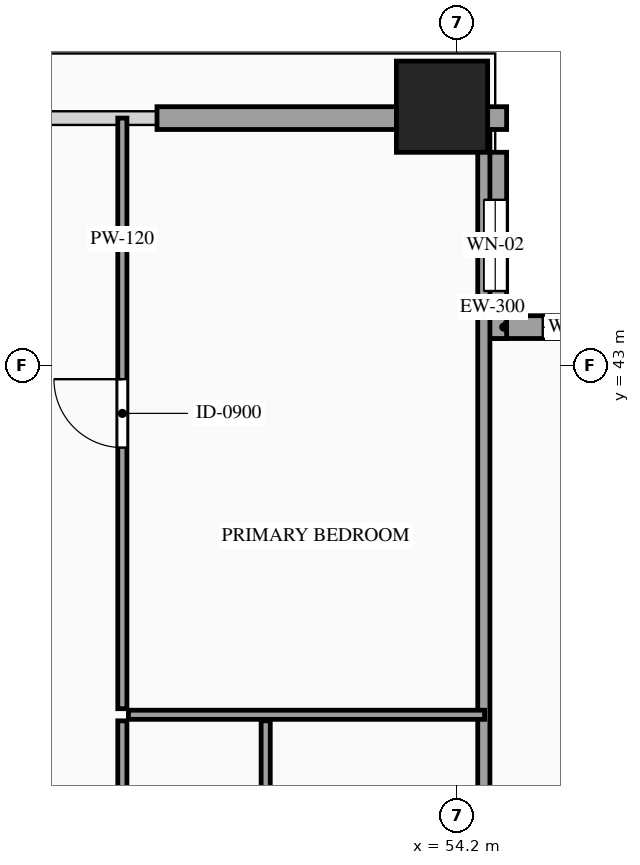
"""IFC4 building model, lengths in metres.
Left out: names, types, materials, properties, quantities, classifications, styles, units other than length and angle.
Written with IfcOpenShell. Run it as: python <this file> out.ifc"""

import sys

from ifc_helpers import new_model, si_unit, direction, frame, frame_2d, origin, origin_2d, place, context, subcontext, project, spatial, rectangle, hollow_rectangle, extrude, source, transform, mapped, element, fill, save


model = new_model("IFC4")
c1 = context("Model", 3, precision=1e-05, world=origin(), true_north=direction((0.0, 1.0)))
c2 = subcontext(c1, "Body", "Model", "MODEL_VIEW")
j1 = project(units=[si_unit("LENGTHUNIT", "METRE"), si_unit("PLANEANGLEUNIT", "RADIAN")], contexts=[c1])
p1 = place(None, origin())
s1 = spatial("IfcSite", under=j1, at=p1, CompositionType="ELEMENT")
p2 = place(p1, origin())
s2 = spatial("IfcBuilding", under=s1, at=p2, CompositionType="ELEMENT")
p3 = place(p2, frame((0.0, 0.0, 248.6)))
s3 = spatial("IfcBuildingStorey", under=s2, at=p3, CompositionType="ELEMENT", Elevation=248.6)
m1 = source(origin(), c2, "Body", "SweptSolid", [
    extrude(hollow_rectangle(XDim=1.2, YDim=1.2, WallThickness=0.055, at=origin_2d()), origin(), (0.0, 0.0, 1.0), 3.5),
])
p4 = place(p3, frame((54.0, 46.4, 0.0), z_axis=(0.0, 0.0, 1.0), x_axis=(1.0, 0.0, 0.0)))
e1 = element("IfcColumn", 1, at=p4, inside=s3, PredefinedType="COLUMN", context=c2, shape_type="MappedRepresentation", body=[
    mapped(m1, transform((0.0, 0.0, 0.0), scale=1.0)),
])
p5 = place(p3, frame((57.0, 43.5, 0.0), z_axis=(0.0, 0.0, 1.0), x_axis=(-1.0, 0.0, 0.0)))
e2 = element("IfcWall", 2, at=p5, inside=s3, PredefinedType="SOLIDWALL", context=c2, shape_type="SweptSolid", body=[
    extrude(rectangle(XDim=2.45, YDim=0.3, at=frame_2d((1.225, 0.0))), origin(), (0.0, 0.0, 1.0), 3.28),
])
p6 = place(p5, frame((0.775, 0.0, 0.85)))
e3 = element("IfcOpeningElement", 3, at=p6, cuts=e2, PredefinedType="OPENING", context=c2, shape_type="SweptSolid", body=[
    extrude(rectangle(XDim=0.9, YDim=1.5, at=frame_2d((0.45, 0.75))), frame((0.0, 0.165, 0.0), z_axis=(0.0, -1.0, 0.0), x_axis=(1.0, 0.0, 0.0)), (0.0, 0.0, 1.0), 0.33),
])
p7 = place(p3, frame((54.7, 43.35, 0.0), z_axis=(0.0, 0.0, 1.0), x_axis=(0.0, 1.0, 0.0)))
e4 = element("IfcWall", 4, at=p7, inside=s3, PredefinedType="SOLIDWALL", context=c2, shape_type="SweptSolid", body=[
    extrude(rectangle(XDim=2.45, YDim=0.3, at=frame_2d((1.225, 0.0))), origin(), (0.0, 0.0, 1.0), 3.28),
])
p8 = place(p7, frame((0.625, 0.0, 0.85)))
e5 = element("IfcOpeningElement", 5, at=p8, cuts=e4, PredefinedType="OPENING", context=c2, shape_type="SweptSolid", body=[
    extrude(rectangle(XDim=1.2, YDim=2.1, at=frame_2d((0.6, 1.05))), frame((0.0, 0.165, 0.0), z_axis=(0.0, -1.0, 0.0), x_axis=(1.0, 0.0, 0.0)), (0.0, 0.0, 1.0), 0.33),
])
m2 = source(origin(), c2, "Body", "SweptSolid", [
    extrude(rectangle(XDim=0.25, YDim=0.3, at=frame_2d((0.125, 0.0))), origin(), (0.0, 0.0, 1.0), 3.28),
])
p9 = place(p3, frame((54.6, 46.25, 0.0), z_axis=(0.0, 0.0, 1.0), x_axis=(1.0, 0.0, 0.0)))
e6 = element("IfcWall", 6, at=p9, inside=s3, PredefinedType="SOLIDWALL", context=c2, shape_type="MappedRepresentation", body=[
    mapped(m2, transform((0.0, 0.0, 0.0), scale=1.0)),
])
m3 = source(origin(), c2, "Body", "SweptSolid", [
    extrude(rectangle(XDim=3.15, YDim=0.3, at=frame_2d((1.575, 0.0))), origin(), (0.0, 0.0, 1.0), 2.835),
])
p10 = place(p3, frame((50.25, 46.25, 0.0), z_axis=(0.0, 0.0, 1.0), x_axis=(1.0, 0.0, 0.0)))
e7 = element("IfcWall", 7, at=p10, inside=s3, PredefinedType="SOLIDWALL", context=c2, shape_type="MappedRepresentation", body=[
    mapped(m3, transform((0.0, 0.0, 0.0), scale=1.0)),
])
m4 = source(origin(), c2, "Body", "SweptSolid", [
    extrude(rectangle(XDim=11.89, YDim=0.16, at=frame_2d((5.945, 0.0))), origin(), (0.0, 0.0, 1.0), 3.28),
])
p11 = place(p3, frame((54.55, 34.21, 0.0), z_axis=(0.0, 0.0, 1.0), x_axis=(0.0, 1.0, 0.0)))
e8 = element("IfcWall", 8, at=p11, inside=s3, PredefinedType="PARTITIONING", context=c2, shape_type="MappedRepresentation", body=[
    mapped(m4, transform((0.0, 0.0, 0.0), scale=1.0)),
])
p12 = place(p3, frame((51.68, 34.21, 0.0), z_axis=(0.0, 0.0, 1.0), x_axis=(0.0, 1.0, 0.0)))
e9 = element("IfcWall", 9, at=p12, inside=s3, PredefinedType="PARTITIONING", context=c2, shape_type="SweptSolid", body=[
    extrude(rectangle(XDim=4.11, YDim=0.12, at=frame_2d((2.055, 0.0))), origin(), (0.0, 0.0, 1.0), 3.28),
])
p13 = place(p12, frame((1.63, 0.0, 0.0)))
e10 = element("IfcOpeningElement", 10, at=p13, cuts=e9, PredefinedType="OPENING", context=c2, shape_type="SweptSolid", body=[
    extrude(rectangle(XDim=0.85, YDim=2.1, at=frame_2d((0.425, 1.05))), frame((0.0, 0.075, 0.0), z_axis=(0.0, -1.0, 0.0), x_axis=(1.0, 0.0, 0.0)), (0.0, 0.0, 1.0), 0.15),
])
m5 = source(origin(), c2, "Body", "SweptSolid", [
    extrude(rectangle(XDim=4.686, YDim=0.12, at=frame_2d((2.343, 0.0))), origin(), (0.0, 0.0, 1.0), 3.28),
])
p14 = place(p3, frame((49.874, 38.4, 0.0), z_axis=(0.0, 0.0, 1.0), x_axis=(1.0, 0.0, 0.0)))
e11 = element("IfcWall", 11, at=p14, inside=s3, PredefinedType="PARTITIONING", context=c2, shape_type="MappedRepresentation", body=[
    mapped(m5, transform((0.0, 0.0, 0.0), scale=1.0)),
])
p15 = place(p3, frame((49.794, 38.48, 0.0), z_axis=(0.0, 0.0, 1.0), x_axis=(0.0, 1.0, 0.0)))
e12 = element("IfcWall", 12, at=p15, inside=s3, PredefinedType="PARTITIONING", context=c2, shape_type="SweptSolid", body=[
    extrude(rectangle(XDim=7.77, YDim=0.12, at=frame_2d((3.885, 0.0))), origin(), (0.0, 0.0, 1.0), 3.28),
])
p16 = place(p15, frame((3.435, 0.0, 0.0)))
e13 = element("IfcOpeningElement", 13, at=p16, cuts=e12, PredefinedType="OPENING", context=c2, shape_type="SweptSolid", body=[
    extrude(rectangle(XDim=0.9, YDim=2.15, at=frame_2d((0.45, 1.075))), frame((0.0, 0.075, 0.0), z_axis=(0.0, -1.0, 0.0), x_axis=(1.0, 0.0, 0.0)), (0.0, 0.0, 1.0), 0.15),
])
p17 = place(p3, frame((49.794, 34.21, 0.0), z_axis=(0.0, 0.0, 1.0), x_axis=(0.0, 1.0, 0.0)))
e14 = element("IfcWall", 14, at=p17, inside=s3, PredefinedType="PARTITIONING", context=c2, shape_type="SweptSolid", body=[
    extrude(rectangle(XDim=4.11, YDim=0.12, at=frame_2d((2.055, 0.0))), origin(), (0.0, 0.0, 1.0), 3.28),
])
p18 = place(p17, frame((1.63, 0.0, 0.0)))
e15 = element("IfcOpeningElement", 15, at=p18, cuts=e14, PredefinedType="OPENING", context=c2, shape_type="SweptSolid", body=[
    extrude(rectangle(XDim=0.85, YDim=2.1, at=frame_2d((0.425, 1.05))), frame((0.0, 0.075, 0.0), z_axis=(0.0, -1.0, 0.0), x_axis=(1.0, 0.0, 0.0)), (0.0, 0.0, 1.0), 0.15),
])
m6 = source(origin(), c2, "Body", "SweptSolid", [
    extrude(rectangle(XDim=0.9, YDim=1.5, at=frame_2d((0.45, 0.75))), frame((0.0, 0.03, 0.0), z_axis=(0.0, -1.0, 0.0), x_axis=(1.0, 0.0, 0.0)), (0.0, 0.0, 1.0), 0.06),
])
p19 = place(p6, origin())
e16 = element("IfcWindow", 16, at=p19, inside=s3, PartitioningType="SINGLE_PANEL", PredefinedType="WINDOW", context=c2, shape_type="MappedRepresentation", body=[
    mapped(m6, transform((0.0, 0.0, 0.0), scale=1.0)),
])
fill(e3, e16)
m7 = source(origin(), c2, "Body", "SweptSolid", [
    extrude(rectangle(XDim=1.2, YDim=2.1, at=frame_2d((0.6, 1.05))), frame((0.0, 0.03, 0.0), z_axis=(0.0, -1.0, 0.0), x_axis=(1.0, 0.0, 0.0)), (0.0, 0.0, 1.0), 0.06),
])
p20 = place(p8, origin())
e17 = element("IfcWindow", 17, at=p20, inside=s3, PartitioningType="SINGLE_PANEL", PredefinedType="WINDOW", context=c2, shape_type="MappedRepresentation", body=[
    mapped(m7, transform((0.0, 0.0, 0.0), scale=1.0)),
])
fill(e5, e17)
m8 = source(origin(), c2, "Body", "SweptSolid", [
    extrude(rectangle(XDim=0.9, YDim=2.15, at=frame_2d((0.45, 1.075))), frame((0.0, 0.025, 0.0), z_axis=(0.0, -1.0, 0.0), x_axis=(1.0, 0.0, 0.0)), (0.0, 0.0, 1.0), 0.05),
])
p21 = place(p16, origin())
e18 = element("IfcDoor", 18, at=p21, inside=s3, OperationType="SINGLE_SWING_RIGHT", PredefinedType="DOOR", context=c2, shape_type="MappedRepresentation", body=[
    mapped(m8, transform((0.0, 0.0, 0.0), scale=1.0)),
])
fill(e13, e18)
save(model, sys.argv[1])
